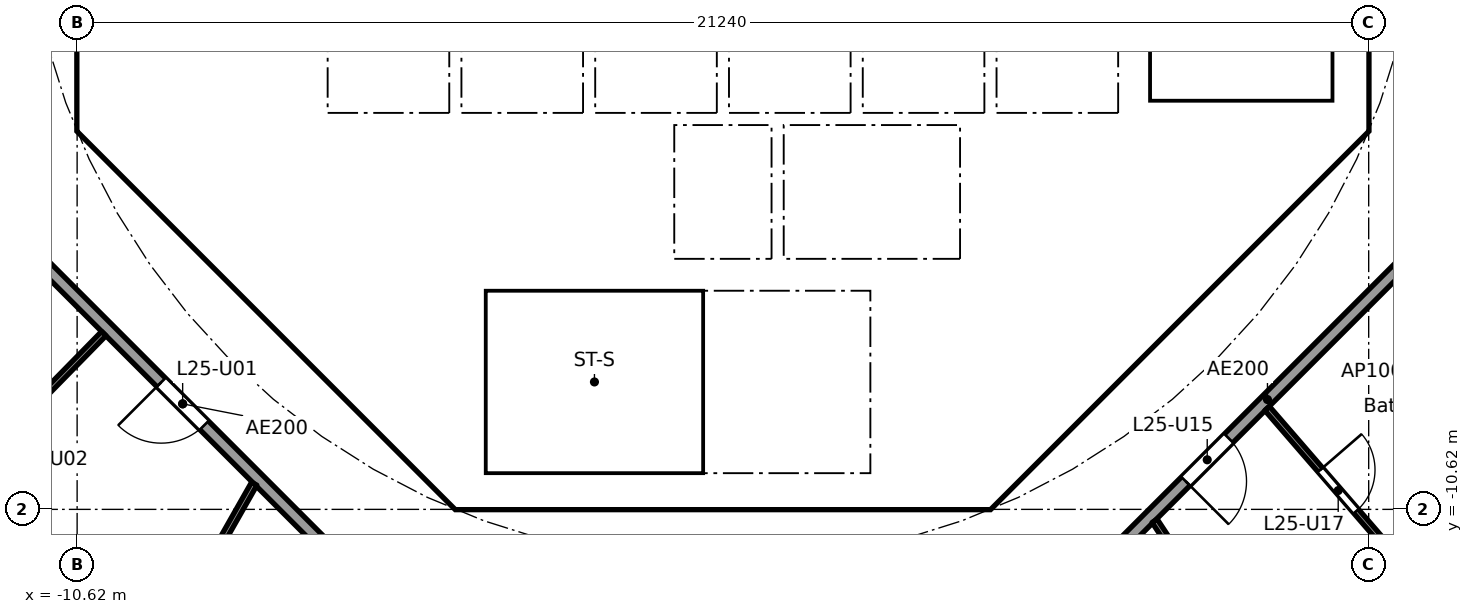
"""IFC4 building model, lengths in metres.
Left out: names, types, materials, properties, quantities, classifications, styles, units other than length and angle.
Written with IfcOpenShell. Run it as: python <this file> out.ifc"""

import sys

from ifc_helpers import new_model, si_unit, direction, frame, frame_2d, origin, place, context, subcontext, project, spatial, polyline, rectangle, outline, extrude, element, fill, save


model = new_model("IFC4")
c1 = context("Model", 3, precision=1e-05, world=origin(), true_north=direction((0.0, 1.0)))
c2 = subcontext(c1, "Body", "Model", "MODEL_VIEW")
j1 = project(units=[si_unit("LENGTHUNIT", "METRE"), si_unit("PLANEANGLEUNIT", "RADIAN")], contexts=[c1])
p1 = place(None, origin())
s1 = spatial("IfcSite", under=j1, at=p1, CompositionType="ELEMENT")
p2 = place(p1, origin())
s2 = spatial("IfcBuilding", under=s1, at=p2, CompositionType="ELEMENT")
p3 = place(p2, frame((0.0, 0.0, 102.9)))
s3 = spatial("IfcBuildingStorey", under=s2, at=p3, CompositionType="ELEMENT", Elevation=102.9)
p4 = place(p3, frame((-10.325, 3.801, 0.0), z_axis=(0.0, 0.0, 1.0), x_axis=(0.0, -1.0, 0.0)))
e1 = element("IfcWall", 1, at=p4, inside=s3, PredefinedType="SHEAR", context=c2, shape_type="SweptSolid", body=[
    extrude(rectangle(XDim=7.602, YDim=0.6, at=frame_2d((3.801, 0.0))), origin(), (0.0, 0.0, 1.0), 3.44),
])
p5 = place(p4, frame((0.651, 0.0, 0.0)))
e2 = element("IfcOpeningElement", 2, at=p5, cuts=e1, PredefinedType="OPENING", context=c2, shape_type="SweptSolid", body=[
    extrude(rectangle(XDim=1.5, YDim=2.1, at=frame_2d((0.75, 1.05))), frame((0.0, 0.31, 0.0), z_axis=(0.0, -1.0, 0.0), x_axis=(1.0, 0.0, 0.0)), (0.0, 0.0, 1.0), 0.62),
])
p6 = place(p4, frame((5.451, 0.0, 0.0)))
e3 = element("IfcOpeningElement", 3, at=p6, cuts=e1, PredefinedType="OPENING", context=c2, shape_type="SweptSolid", body=[
    extrude(rectangle(XDim=1.5, YDim=2.1, at=frame_2d((0.75, 1.05))), frame((0.0, 0.31, 0.0), z_axis=(0.0, -1.0, 0.0), x_axis=(1.0, 0.0, 0.0)), (0.0, 0.0, 1.0), 0.62),
])
p7 = place(p3, frame((-9.988, -4.613, 0.0), z_axis=(0.0, 0.0, 1.0), x_axis=(0.707106781187, -0.707106781187, 0.0)))
e4 = element("IfcWall", 4, at=p7, inside=s3, PredefinedType="SHEAR", context=c2, shape_type="SweptSolid", body=[
    extrude(rectangle(XDim=7.602, YDim=0.6, at=frame_2d((3.801, 0.0))), origin(), (0.0, 0.0, 1.0), 3.44),
])
p8 = place(p7, frame((6.151, 0.0, 0.0)))
e5 = element("IfcOpeningElement", 5, at=p8, cuts=e4, PredefinedType="OPENING", context=c2, shape_type="SweptSolid", body=[
    extrude(rectangle(XDim=1.1, YDim=2.1, at=frame_2d((0.55, 1.05))), frame((0.0, 0.31, 0.0), z_axis=(0.0, -1.0, 0.0), x_axis=(1.0, 0.0, 0.0)), (0.0, 0.0, 1.0), 0.62),
])
p9 = place(p3, frame((4.613, -9.988, 0.0), z_axis=(0.0, 0.0, 1.0), x_axis=(0.707106781187, 0.707106781187, 0.0)))
e6 = element("IfcWall", 6, at=p9, inside=s3, PredefinedType="SHEAR", context=c2, shape_type="SweptSolid", body=[
    extrude(rectangle(XDim=7.602, YDim=0.6, at=frame_2d((3.801, 0.0))), origin(), (0.0, 0.0, 1.0), 3.44),
])
p10 = place(p9, frame((3.201, 0.0, 0.0)))
e7 = element("IfcOpeningElement", 7, at=p10, cuts=e6, PredefinedType="OPENING", context=c2, shape_type="SweptSolid", body=[
    extrude(rectangle(XDim=1.2, YDim=2.1, at=frame_2d((0.6, 1.05))), frame((0.0, 0.31, 0.0), z_axis=(0.0, -1.0, 0.0), x_axis=(1.0, 0.0, 0.0)), (0.0, 0.0, 1.0), 0.62),
])
p11 = place(p3, frame((4.0, -10.025, 0.0), z_axis=(0.0, 0.0, 1.0), x_axis=(0.0, 1.0, 0.0)))
e8 = element("IfcWall", 8, at=p11, inside=s3, PredefinedType="SOLIDWALL", context=c2, shape_type="SweptSolid", body=[
    extrude(rectangle(XDim=3.0, YDim=0.2, at=frame_2d((1.5, 0.0))), origin(), (0.0, 0.0, 1.0), 3.44),
])
p12 = place(p11, frame((0.975, 0.0, 0.0)))
e9 = element("IfcOpeningElement", 9, at=p12, cuts=e8, PredefinedType="OPENING", context=c2, shape_type="SweptSolid", body=[
    extrude(rectangle(XDim=1.1, YDim=2.1, at=frame_2d((0.55, 1.05))), frame((0.0, 0.11, 0.0), z_axis=(0.0, -1.0, 0.0), x_axis=(1.0, 0.0, 0.0)), (0.0, 0.0, 1.0), 0.22),
])
p13 = place(p3, frame((-5.8, -8.227, 0.0), z_axis=(0.0, 0.0, 1.0), x_axis=(0.0, 1.0, 0.0)))
e10 = element("IfcWall", 10, at=p13, inside=s3, PredefinedType="PARTITIONING", context=c2, shape_type="SweptSolid", body=[
    extrude(rectangle(XDim=3.927, YDim=0.15, at=frame_2d((1.963, 0.0))), origin(), (0.0, 0.0, 1.0), 3.44),
])
p14 = place(p13, frame((2.615, 0.0, 0.0)))
e11 = element("IfcOpeningElement", 11, at=p14, cuts=e10, PredefinedType="OPENING", context=c2, shape_type="SweptSolid", body=[
    extrude(rectangle(XDim=0.9, YDim=2.1, at=frame_2d((0.45, 1.05))), frame((0.0, 0.085, 0.0), z_axis=(0.0, -1.0, 0.0), x_axis=(1.0, 0.0, 0.0)), (0.0, 0.0, 1.0), 0.17),
])
p15 = place(p13, frame((0.539, 0.0, 0.0)))
e12 = element("IfcOpeningElement", 12, at=p15, cuts=e10, PredefinedType="OPENING", context=c2, shape_type="SweptSolid", body=[
    extrude(rectangle(XDim=0.9, YDim=2.1, at=frame_2d((0.45, 1.05))), frame((0.0, 0.085, 0.0), z_axis=(0.0, -1.0, 0.0), x_axis=(1.0, 0.0, 0.0)), (0.0, 0.0, 1.0), 0.17),
])
p16 = place(p3, frame((4.0, -6.5, 0.0), z_axis=(0.0, 0.0, 1.0), x_axis=(0.0, 1.0, 0.0)))
e13 = element("IfcWall", 13, at=p16, inside=s3, PredefinedType="SOLIDWALL", context=c2, shape_type="SweptSolid", body=[
    extrude(rectangle(XDim=2.2, YDim=0.2, at=frame_2d((1.1, 0.0))), origin(), (0.0, 0.0, 1.0), 3.44),
])
p17 = place(p16, frame((0.55, 0.0, 0.0)))
e14 = element("IfcOpeningElement", 14, at=p17, cuts=e13, PredefinedType="OPENING", context=c2, shape_type="SweptSolid", body=[
    extrude(rectangle(XDim=1.1, YDim=2.1, at=frame_2d((0.55, 1.05))), frame((0.0, 0.11, 0.0), z_axis=(0.0, -1.0, 0.0), x_axis=(1.0, 0.0, 0.0)), (0.0, 0.0, 1.0), 0.22),
])
p18 = place(p3, frame((-4.0, -6.5, 0.0), z_axis=(0.0, 0.0, 1.0), x_axis=(0.0, 1.0, 0.0)))
e15 = element("IfcWall", 15, at=p18, inside=s3, PredefinedType="SOLIDWALL", context=c2, shape_type="SweptSolid", body=[
    extrude(rectangle(XDim=2.2, YDim=0.2, at=frame_2d((1.1, 0.0))), origin(), (0.0, 0.0, 1.0), 3.44),
])
p19 = place(p18, frame((0.65, 0.0, 0.0)))
e16 = element("IfcOpeningElement", 16, at=p19, cuts=e15, PredefinedType="OPENING", context=c2, shape_type="SweptSolid", body=[
    extrude(rectangle(XDim=0.9, YDim=2.1, at=frame_2d((0.45, 1.05))), frame((0.0, 0.11, 0.0), z_axis=(0.0, -1.0, 0.0), x_axis=(1.0, 0.0, 0.0)), (0.0, 0.0, 1.0), 0.22),
])
p20 = place(p3, origin())
e17 = element("IfcWall", 17, at=p20, inside=s3, PredefinedType="SHEAR", context=c2, shape_type="SweptSolid", body=[
    extrude(outline(polyline([(-10.625, -3.801), (-10.025, -3.801), (-10.025, -4.152), (-9.776, -4.401), (-10.2, -4.825), (-10.625, -4.401), (-10.625, -3.801)])), origin(), (0.0, 0.0, 1.0), 3.44),
])
p21 = place(p3, origin())
e18 = element("IfcWall", 18, at=p21, inside=s3, PredefinedType="SHEAR", context=c2, shape_type="SweptSolid", body=[
    extrude(outline(polyline([(-4.152, -10.025), (4.152, -10.025), (4.401, -9.776), (4.825, -10.2), (4.401, -10.625), (-4.401, -10.625), (-4.825, -10.2), (-4.401, -9.776), (-4.152, -10.025)])), origin(), (0.0, 0.0, 1.0), 3.44),
])
p22 = place(p3, origin())
e19 = element("IfcWall", 19, at=p22, inside=s3, PredefinedType="SHEAR", context=c2, shape_type="SweptSolid", body=[
    extrude(outline(polyline([(9.776, -4.401), (10.025, -4.152), (10.025, -3.801), (10.025, 4.152), (9.776, 4.401), (10.2, 4.825), (10.625, 4.401), (10.625, -4.401), (10.2, -4.825), (9.776, -4.401)])), origin(), (0.0, 0.0, 1.0), 3.44),
])
p23 = place(p3, frame((-10.025, -4.0, 0.0), z_axis=(0.0, 0.0, 1.0), x_axis=(1.0, 0.0, 0.0)))
e20 = element("IfcWall", 20, at=p23, inside=s3, PredefinedType="PARTITIONING", context=c2, shape_type="SweptSolid", body=[
    extrude(rectangle(XDim=3.325, YDim=0.2, at=frame_2d((1.662, 0.0))), origin(), (0.0, 0.0, 1.0), 3.44),
])
p24 = place(p3, frame((-8.001, -6.1, 0.0), z_axis=(0.0, 0.0, 1.0), x_axis=(1.0, 0.0, 0.0)))
e21 = element("IfcWall", 21, at=p24, inside=s3, PredefinedType="PARTITIONING", context=c2, shape_type="SweptSolid", body=[
    extrude(rectangle(XDim=2.126, YDim=0.15, at=frame_2d((1.063, 0.0))), origin(), (0.0, 0.0, 1.0), 3.44),
])
for number, where, z_axis, x_axis in (
    (22, (-0.9, -6.5, 0.0), (0.0, 0.0, 1.0), (0.0, 1.0, 0.0)),
    (23, (0.9, -6.5, 0.0), (0.0, 0.0, 1.0), (0.0, 1.0, 0.0)),
):
    element("IfcWall", number, at=place(p3, frame(where, z_axis=z_axis, x_axis=x_axis)), inside=s3, PredefinedType="SOLIDWALL", context=c2, shape_type="SweptSolid", body=[
        extrude(rectangle(XDim=2.2, YDim=0.2, at=frame_2d((1.1, 0.0))), origin(), (0.0, 0.0, 1.0), 3.44),
    ])
p25 = place(p3, origin())
e24 = element("IfcWall", 24, at=p25, inside=s3, PredefinedType="SOLIDWALL", context=c2, shape_type="SweptSolid", body=[
    extrude(outline(polyline([(-6.7, -2.1), (-6.5, -2.1), (-6.5, -4.1), (-4.5, -4.1), (-4.5, -2.1), (-4.3, -2.1), (-4.3, -4.1), (-2.3, -4.1), (-2.3, -2.1), (-2.1, -2.1), (-2.1, -4.1), (-0.1, -4.1), (-0.1, -2.1), (0.1, -2.1), (0.1, -4.1), (2.1, -4.1), (2.1, -2.1), (2.3, -2.1), (2.3, -4.1), (4.3, -4.1), (4.3, -2.1), (4.5, -2.1), (4.5, -4.1), (6.5, -4.1), (6.5, -2.1), (6.7, -2.1), (6.7, -4.3), (-6.7, -4.3), (-6.7, -2.1)])), origin(), (0.0, 0.0, 1.0), 3.44),
])
p26 = place(p3, origin())
e25 = element("IfcWall", 25, at=p26, inside=s3, PredefinedType="SOLIDWALL", context=c2, shape_type="SweptSolid", body=[
    extrude(outline(polyline([(-3.9, -10.025), (-4.1, -10.025), (-4.1, -7.025), (-3.9, -7.025), (-3.9, -10.025)])), origin(), (0.0, 0.0, 1.0), 3.44),
])
p27 = place(p3, origin())
e26 = element("IfcWall", 26, at=p27, inside=s3, PredefinedType="SOLIDWALL", context=c2, shape_type="SweptSolid", body=[
    extrude(outline(polyline([(4.1, -7.025), (-4.1, -7.025), (-4.1, -6.5), (4.1, -6.5), (4.1, -7.025)])), origin(), (0.0, 0.0, 1.0), 3.44),
])
p28 = place(p3, origin())
e27 = element("IfcWall", 27, at=p28, inside=s3, PredefinedType="SOLIDWALL", context=c2, shape_type="SweptSolid", body=[
    extrude(outline(polyline([(7.025, -3.9), (6.7, -3.9), (6.7, 3.9), (7.025, 3.9), (7.025, -3.9)])), origin(), (0.0, 0.0, 1.0), 3.44),
])
p29 = place(p3, origin())
e28 = element("IfcWall", 28, at=p29, inside=s3, PredefinedType="SOLIDWALL", context=c2, shape_type="SweptSolid", body=[
    extrude(outline(polyline([(10.025, -4.1), (6.7, -4.1), (6.7, -3.9), (10.025, -3.9), (10.025, -4.1)])), origin(), (0.0, 0.0, 1.0), 3.44),
])
p30 = place(p3, frame((-12.635, -5.134, 0.0), z_axis=(0.0, 0.0, 1.0), x_axis=(0.707106781187, -0.707106781187, 0.0)))
e29 = element("IfcWall", 29, at=p30, inside=s3, PredefinedType="PARTITIONING", context=c2, shape_type="SweptSolid", body=[
    extrude(rectangle(XDim=10.609, YDim=0.2, at=frame_2d((5.305, 0.0))), origin(), (0.0, 0.0, 1.0), 3.44),
])
p31 = place(p30, frame((4.804, 0.0, 0.0)))
e30 = element("IfcOpeningElement", 30, at=p31, cuts=e29, PredefinedType="OPENING", context=c2, shape_type="SweptSolid", body=[
    extrude(rectangle(XDim=1.0, YDim=2.1, at=frame_2d((0.5, 1.05))), frame((0.0, 0.11, 0.0), z_axis=(0.0, -1.0, 0.0), x_axis=(1.0, 0.0, 0.0)), (0.0, 0.0, 1.0), 0.22),
])
p32 = place(p3, frame((5.275, -12.494, 0.0), z_axis=(0.0, 0.0, 1.0), x_axis=(0.707106781187, 0.707106781187, 0.0)))
e31 = element("IfcWall", 31, at=p32, inside=s3, PredefinedType="PARTITIONING", context=c2, shape_type="SweptSolid", body=[
    extrude(rectangle(XDim=10.409, YDim=0.2, at=frame_2d((5.205, 0.0))), origin(), (0.0, 0.0, 1.0), 3.44),
])
p33 = place(p32, frame((3.303, 0.0, 0.0)))
e32 = element("IfcOpeningElement", 32, at=p33, cuts=e31, PredefinedType="OPENING", context=c2, shape_type="SweptSolid", body=[
    extrude(rectangle(XDim=1.0, YDim=2.1, at=frame_2d((0.5, 1.05))), frame((0.0, 0.11, 0.0), z_axis=(0.0, -1.0, 0.0), x_axis=(1.0, 0.0, 0.0)), (0.0, 0.0, 1.0), 0.22),
])
p34 = place(p3, frame((-10.181, -7.729, 0.0), z_axis=(0.0, 0.0, 1.0), x_axis=(-0.699710752188, -0.714426247609, 0.0)))
e33 = element("IfcWall", 33, at=p34, inside=s3, PredefinedType="PARTITIONING", context=c2, shape_type="SweptSolid", body=[
    extrude(rectangle(XDim=9.938, YDim=0.1, at=frame_2d((4.969, 0.0))), origin(), (0.0, 0.0, 1.0), 2.687),
])
p35 = place(p34, frame((1.675, 0.0, 0.0)))
e34 = element("IfcOpeningElement", 34, at=p35, cuts=e33, PredefinedType="OPENING", context=c2, shape_type="SweptSolid", body=[
    extrude(rectangle(XDim=0.9, YDim=2.1, at=frame_2d((0.45, 1.05))), frame((0.0, 0.06, 0.0), z_axis=(0.0, -1.0, 0.0), x_axis=(1.0, 0.0, 0.0)), (0.0, 0.0, 1.0), 0.12),
])
p36 = place(p34, frame((6.619, 0.0, 0.0)))
e35 = element("IfcOpeningElement", 35, at=p36, cuts=e33, PredefinedType="OPENING", context=c2, shape_type="SweptSolid", body=[
    extrude(rectangle(XDim=0.9, YDim=2.1, at=frame_2d((0.45, 1.05))), frame((0.0, 0.06, 0.0), z_axis=(0.0, -1.0, 0.0), x_axis=(1.0, 0.0, 0.0)), (0.0, 0.0, 1.0), 0.12),
])
p37 = place(p3, frame((-7.707, -10.198, 0.0), z_axis=(0.0, 0.0, 1.0), x_axis=(-0.49395524734, -0.869487328042, 0.0)))
e36 = element("IfcWall", 36, at=p37, inside=s3, PredefinedType="PARTITIONING", context=c2, shape_type="SweptSolid", body=[
    extrude(rectangle(XDim=15.025, YDim=0.1, at=frame_2d((7.512, 0.0))), origin(), (0.0, 0.0, 1.0), 2.687),
])
p38 = place(p37, frame((1.684, 0.0, 0.0)))
e37 = element("IfcOpeningElement", 37, at=p38, cuts=e36, PredefinedType="OPENING", context=c2, shape_type="SweptSolid", body=[
    extrude(rectangle(XDim=0.9, YDim=2.1, at=frame_2d((0.45, 1.05))), frame((0.0, 0.06, 0.0), z_axis=(0.0, -1.0, 0.0), x_axis=(1.0, 0.0, 0.0)), (0.0, 0.0, 1.0), 0.12),
])
p39 = place(p37, frame((6.648, 0.0, 0.0)))
e38 = element("IfcOpeningElement", 38, at=p39, cuts=e36, PredefinedType="OPENING", context=c2, shape_type="SweptSolid", body=[
    extrude(rectangle(XDim=0.9, YDim=2.1, at=frame_2d((0.45, 1.05))), frame((0.0, 0.06, 0.0), z_axis=(0.0, -1.0, 0.0), x_axis=(1.0, 0.0, 0.0)), (0.0, 0.0, 1.0), 0.12),
])
p40 = place(p37, frame((12.027, 0.0, 0.0)))
e39 = element("IfcOpeningElement", 39, at=p40, cuts=e36, PredefinedType="OPENING", context=c2, shape_type="SweptSolid", body=[
    extrude(rectangle(XDim=0.9, YDim=2.1, at=frame_2d((0.45, 1.05))), frame((0.0, 0.06, 0.0), z_axis=(0.0, -1.0, 0.0), x_axis=(1.0, 0.0, 0.0)), (0.0, 0.0, 1.0), 0.12),
])
p41 = place(p3, frame((7.1, -10.808, 0.0), z_axis=(0.0, 0.0, 1.0), x_axis=(0.550294419528, -0.834970689208, 0.0)))
e40 = element("IfcWall", 40, at=p41, inside=s3, PredefinedType="PARTITIONING", context=c2, shape_type="SweptSolid", body=[
    extrude(rectangle(XDim=3.472, YDim=0.1, at=frame_2d((1.736, 0.0))), origin(), (0.0, 0.0, 1.0), 2.687),
])
p42 = place(p41, frame((1.286, 0.0, 0.0)))
e41 = element("IfcOpeningElement", 41, at=p42, cuts=e40, PredefinedType="OPENING", context=c2, shape_type="SweptSolid", body=[
    extrude(rectangle(XDim=0.9, YDim=2.1, at=frame_2d((0.45, 1.05))), frame((0.0, 0.06, 0.0), z_axis=(0.0, -1.0, 0.0), x_axis=(1.0, 0.0, 0.0)), (0.0, 0.0, 1.0), 0.12),
])
p43 = place(p3, frame((8.95, -8.96, 0.0), z_axis=(0.0, 0.0, 1.0), x_axis=(0.65441081073, -0.756139200676, 0.0)))
e42 = element("IfcWall", 42, at=p43, inside=s3, PredefinedType="PARTITIONING", context=c2, shape_type="SweptSolid", body=[
    extrude(rectangle(XDim=12.451, YDim=0.1, at=frame_2d((6.226, 0.0))), origin(), (0.0, 0.0, 1.0), 2.687),
])
p44 = place(p43, frame((1.336, 0.0, 0.0)))
e43 = element("IfcOpeningElement", 43, at=p44, cuts=e42, PredefinedType="OPENING", context=c2, shape_type="SweptSolid", body=[
    extrude(rectangle(XDim=0.9, YDim=2.1, at=frame_2d((0.45, 1.05))), frame((0.0, 0.06, 0.0), z_axis=(0.0, -1.0, 0.0), x_axis=(1.0, 0.0, 0.0)), (0.0, 0.0, 1.0), 0.12),
])
p45 = place(p43, frame((5.501, 0.0, 0.0)))
e44 = element("IfcOpeningElement", 44, at=p45, cuts=e42, PredefinedType="OPENING", context=c2, shape_type="SweptSolid", body=[
    extrude(rectangle(XDim=0.9, YDim=2.1, at=frame_2d((0.45, 1.05))), frame((0.0, 0.06, 0.0), z_axis=(0.0, -1.0, 0.0), x_axis=(1.0, 0.0, 0.0)), (0.0, 0.0, 1.0), 0.12),
])
p46 = place(p43, frame((9.941, 0.0, 0.0)))
e45 = element("IfcOpeningElement", 45, at=p46, cuts=e42, PredefinedType="OPENING", context=c2, shape_type="SweptSolid", body=[
    extrude(rectangle(XDim=0.9, YDim=2.1, at=frame_2d((0.45, 1.05))), frame((0.0, 0.06, 0.0), z_axis=(0.0, -1.0, 0.0), x_axis=(1.0, 0.0, 0.0)), (0.0, 0.0, 1.0), 0.12),
])
p47 = place(p17, origin())
e46 = element("IfcDoor", 46, at=p47, inside=s3, OperationType="DOUBLE_DOOR_SLIDING", PredefinedType="DOOR", context=c2, shape_type="SweptSolid", body=[
    extrude(rectangle(XDim=1.1, YDim=2.1, at=frame_2d((0.55, 1.05))), frame((0.0, 0.025, 0.0), z_axis=(0.0, -1.0, 0.0), x_axis=(1.0, 0.0, 0.0)), (0.0, 0.0, 1.0), 0.05),
])
fill(e14, e46)
p48 = place(p12, origin())
e47 = element("IfcDoor", 47, at=p48, inside=s3, OperationType="SINGLE_SWING_RIGHT", PredefinedType="DOOR", context=c2, shape_type="SweptSolid", body=[
    extrude(rectangle(XDim=1.1, YDim=2.1, at=frame_2d((0.55, 1.05))), frame((0.0, 0.025, 0.0), z_axis=(0.0, -1.0, 0.0), x_axis=(1.0, 0.0, 0.0)), (0.0, 0.0, 1.0), 0.05),
])
fill(e9, e47)
p49 = place(p14, origin())
e48 = element("IfcDoor", 48, at=p49, inside=s3, OperationType="SINGLE_SWING_RIGHT", PredefinedType="DOOR", context=c2, shape_type="SweptSolid", body=[
    extrude(rectangle(XDim=0.9, YDim=2.1, at=frame_2d((0.45, 1.05))), frame((0.0, 0.025, 0.0), z_axis=(0.0, -1.0, 0.0), x_axis=(1.0, 0.0, 0.0)), (0.0, 0.0, 1.0), 0.05),
])
fill(e11, e48)
p50 = place(p15, origin())
e49 = element("IfcDoor", 49, at=p50, inside=s3, OperationType="SINGLE_SWING_RIGHT", PredefinedType="DOOR", context=c2, shape_type="SweptSolid", body=[
    extrude(rectangle(XDim=0.9, YDim=2.1, at=frame_2d((0.45, 1.05))), frame((0.0, 0.025, 0.0), z_axis=(0.0, -1.0, 0.0), x_axis=(1.0, 0.0, 0.0)), (0.0, 0.0, 1.0), 0.05),
])
fill(e12, e49)
p51 = place(p19, frame((0.9, 0.0, 0.0), x_axis=(-1.0, 0.0, 0.0)))
e50 = element("IfcDoor", 50, at=p51, inside=s3, OperationType="SINGLE_SWING_RIGHT", PredefinedType="DOOR", context=c2, shape_type="SweptSolid", body=[
    extrude(rectangle(XDim=0.9, YDim=2.1, at=frame_2d((0.45, 1.05))), frame((0.0, 0.025, 0.0), z_axis=(0.0, -1.0, 0.0), x_axis=(1.0, 0.0, 0.0)), (0.0, 0.0, 1.0), 0.05),
])
fill(e16, e50)
p52 = place(p10, origin())
e51 = element("IfcDoor", 51, at=p52, inside=s3, OperationType="SINGLE_SWING_LEFT", PredefinedType="DOOR", context=c2, shape_type="SweptSolid", body=[
    extrude(rectangle(XDim=1.2, YDim=2.1, at=frame_2d((0.6, 1.05))), frame((0.0, 0.025, 0.0), z_axis=(0.0, -1.0, 0.0), x_axis=(1.0, 0.0, 0.0)), (0.0, 0.0, 1.0), 0.05),
])
fill(e7, e51)
p53 = place(p6, origin())
e52 = element("IfcDoor", 52, at=p53, inside=s3, OperationType="DOUBLE_DOOR_SINGLE_SWING", PredefinedType="DOOR", context=c2, shape_type="SweptSolid", body=[
    extrude(rectangle(XDim=1.5, YDim=2.1, at=frame_2d((0.75, 1.05))), frame((0.0, 0.025, 0.0), z_axis=(0.0, -1.0, 0.0), x_axis=(1.0, 0.0, 0.0)), (0.0, 0.0, 1.0), 0.05),
])
fill(e3, e52)
p54 = place(p8, origin())
e53 = element("IfcDoor", 53, at=p54, inside=s3, OperationType="SINGLE_SWING_LEFT", PredefinedType="DOOR", context=c2, shape_type="SweptSolid", body=[
    extrude(rectangle(XDim=1.1, YDim=2.1, at=frame_2d((0.55, 1.05))), frame((0.0, 0.025, 0.0), z_axis=(0.0, -1.0, 0.0), x_axis=(1.0, 0.0, 0.0)), (0.0, 0.0, 1.0), 0.05),
])
fill(e5, e53)
p55 = place(p31, frame((1.0, 0.0, 0.0), x_axis=(-1.0, 0.0, 0.0)))
e54 = element("IfcDoor", 54, at=p55, inside=s3, OperationType="SINGLE_SWING_RIGHT", PredefinedType="DOOR", context=c2, shape_type="SweptSolid", body=[
    extrude(rectangle(XDim=1.0, YDim=2.1, at=frame_2d((0.5, 1.05))), frame((0.0, 0.025, 0.0), z_axis=(0.0, -1.0, 0.0), x_axis=(1.0, 0.0, 0.0)), (0.0, 0.0, 1.0), 0.05),
])
fill(e30, e54)
p56 = place(p33, frame((1.0, 0.0, 0.0), x_axis=(-1.0, 0.0, 0.0)))
e55 = element("IfcDoor", 55, at=p56, inside=s3, OperationType="SINGLE_SWING_RIGHT", PredefinedType="DOOR", context=c2, shape_type="SweptSolid", body=[
    extrude(rectangle(XDim=1.0, YDim=2.1, at=frame_2d((0.5, 1.05))), frame((0.0, 0.025, 0.0), z_axis=(0.0, -1.0, 0.0), x_axis=(1.0, 0.0, 0.0)), (0.0, 0.0, 1.0), 0.05),
])
fill(e32, e55)
p57 = place(p44, origin())
e56 = element("IfcDoor", 56, at=p57, inside=s3, OperationType="SINGLE_SWING_LEFT", PredefinedType="DOOR", context=c2, shape_type="SweptSolid", body=[
    extrude(rectangle(XDim=0.9, YDim=2.1, at=frame_2d((0.45, 1.05))), frame((0.0, 0.025, 0.0), z_axis=(0.0, -1.0, 0.0), x_axis=(1.0, 0.0, 0.0)), (0.0, 0.0, 1.0), 0.05),
])
fill(e43, e56)
save(model, sys.argv[1])
